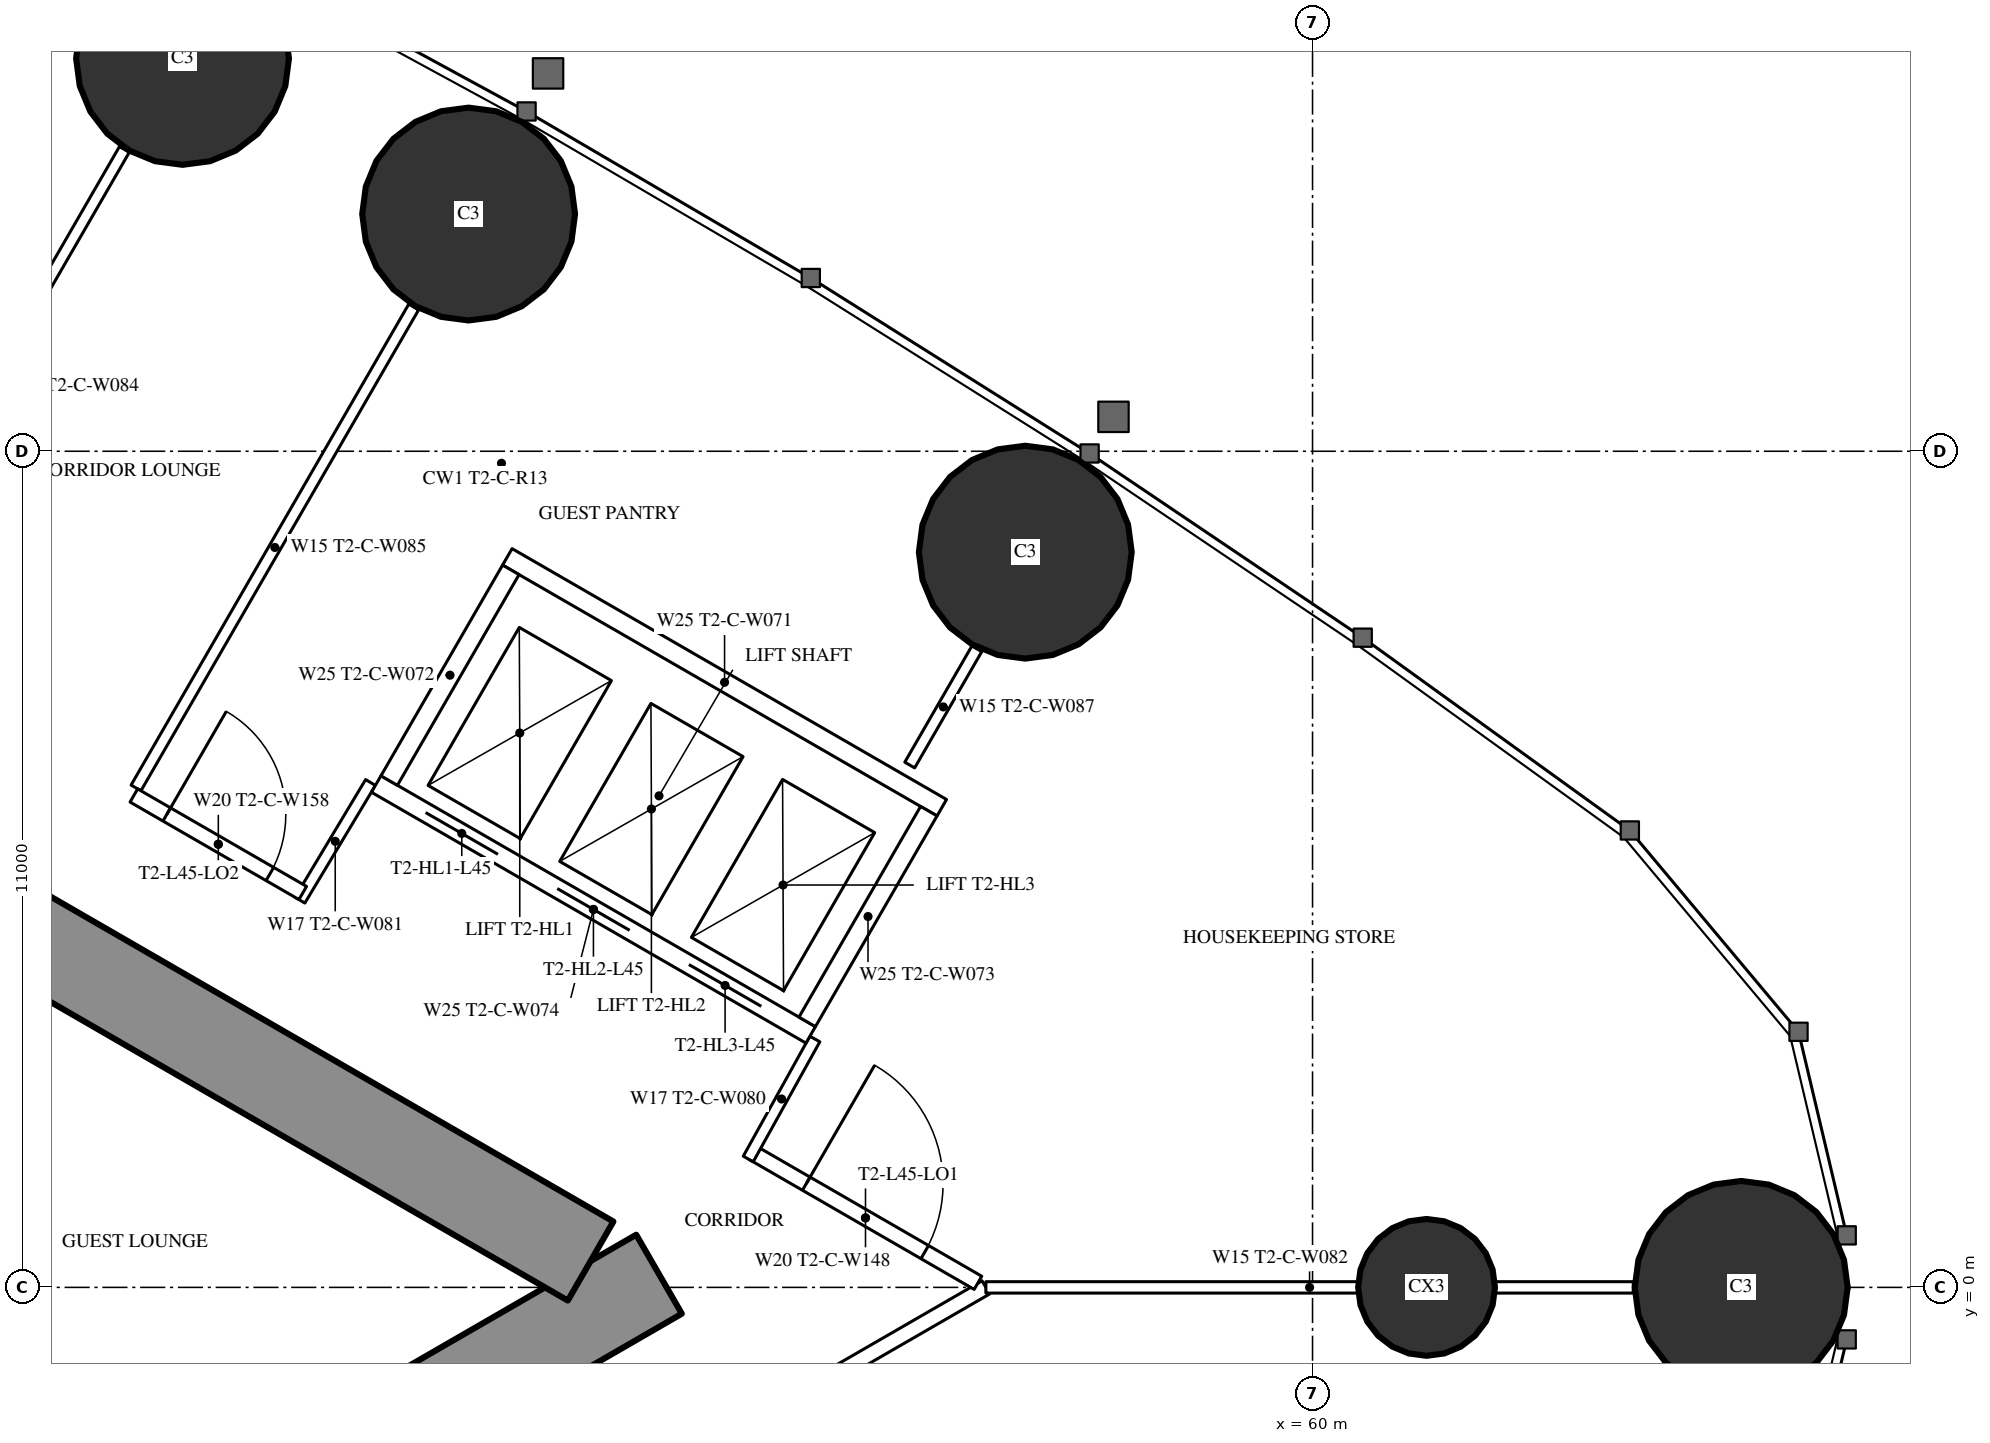
"""IFC4 building model, lengths in metres.
Left out: names, types, materials, properties, quantities, classifications, styles, units other than length and angle.
Written with IfcOpenShell. Run it as: python <this file> out.ifc"""

import sys

from ifc_helpers import new_model, si_unit, direction, frame, frame_2d, origin, origin_2d, place, context, subcontext, project, spatial, rectangle, circle, extrude, element, fill, save


model = new_model("IFC4")
c1 = context("Model", 3, precision=1e-05, world=origin(), true_north=direction((0.0, 1.0)))
c2 = subcontext(c1, "Body", "Model", "MODEL_VIEW")
j1 = project(units=[si_unit("LENGTHUNIT", "METRE"), si_unit("PLANEANGLEUNIT", "RADIAN")], contexts=[c1])
p1 = place(None, origin())
s1 = spatial("IfcSite", under=j1, at=p1, CompositionType="ELEMENT")
p2 = place(p1, origin())
s2 = spatial("IfcBuilding", under=s1, at=p2, CompositionType="ELEMENT")
p3 = place(p2, frame((0.0, 0.0, 170.3)))
s3 = spatial("IfcBuildingStorey", under=s2, at=p3, CompositionType="ELEMENT", Elevation=170.3)
for number, where, z_axis, x_axis in (
    (1, (65.64, 0.0, 0.0), (0.0, 0.0, 1.0), (1.0, 0.0, 0.0)),
    (2, (56.221, 9.672, 0.0), (0.0, 0.0, 1.0), (1.0, 0.0, 0.0)),
    (3, (48.897, 14.121, 0.0), (0.0, 0.0, 1.0), (1.0, 0.0, 0.0)),
    (4, (45.134, 16.168, 0.0), (0.0, 0.0, 1.0), (1.0, 0.0, 0.0)),
):
    element("IfcColumn", number, at=place(p3, frame(where, z_axis=z_axis, x_axis=x_axis)), inside=s3, PredefinedType="COLUMN", context=c2, shape_type="SweptSolid", body=[
        extrude(circle(Radius=1.4, at=origin_2d()), origin(), (0.0, 0.0, 1.0), 3.5),
    ])
p4 = place(p3, frame((61.5, 0.0, 0.0), z_axis=(0.0, 0.0, 1.0), x_axis=(1.0, 0.0, 0.0)))
e5 = element("IfcColumn", 5, at=p4, inside=s3, PredefinedType="COLUMN", context=c2, shape_type="SweptSolid", body=[
    extrude(circle(Radius=0.9, at=origin_2d()), origin(), (0.0, 0.0, 1.0), 3.5),
])
p5 = place(p3, frame((27.2, -13.8, 0.0), z_axis=(0.0, 0.0, 1.0), x_axis=(0.866027159892, 0.499996958321, 0.0)))
e6 = element("IfcWall", 6, at=p5, inside=s3, PredefinedType="SHEAR", context=c2, shape_type="SweptSolid", body=[
    extrude(rectangle(XDim=27.947, YDim=1.2, at=frame_2d((13.973, 0.0))), origin(), (0.0, 0.0, 1.0), 3.5),
])
p6 = place(p5, frame((4.6, 0.0, 0.0)))
e7 = element("IfcOpeningElement", 7, at=p6, cuts=e6, PredefinedType="OPENING", context=c2, shape_type="SweptSolid", body=[
    extrude(rectangle(XDim=1.0, YDim=2.2, at=frame_2d((0.5, 1.1))), frame((0.0, 0.61, 0.0), z_axis=(0.0, -1.0, 0.0), x_axis=(1.0, 0.0, 0.0)), (0.0, 0.0, 1.0), 1.22),
])
p7 = place(p5, frame((13.395, 0.0, 0.0)))
e8 = element("IfcOpeningElement", 8, at=p7, cuts=e6, PredefinedType="OPENING", context=c2, shape_type="SweptSolid", body=[
    extrude(rectangle(XDim=1.8, YDim=2.2, at=frame_2d((0.9, 1.1))), frame((0.0, 0.61, 0.0), z_axis=(0.0, -1.0, 0.0), x_axis=(1.0, 0.0, 0.0)), (0.0, 0.0, 1.0), 1.22),
])
p8 = place(p3, frame((27.2, 13.8, 0.0), z_axis=(0.0, 0.0, 1.0), x_axis=(0.866024515034, -0.500001539357, 0.0)))
e9 = element("IfcWall", 9, at=p8, inside=s3, PredefinedType="SHEAR", context=c2, shape_type="SweptSolid", body=[
    extrude(rectangle(XDim=26.907, YDim=1.2, at=frame_2d((13.454, 0.0))), origin(), (0.0, 0.0, 1.0), 3.5),
])
p9 = place(p8, frame((4.6, 0.0, 0.0)))
e10 = element("IfcOpeningElement", 10, at=p9, cuts=e9, PredefinedType="OPENING", context=c2, shape_type="SweptSolid", body=[
    extrude(rectangle(XDim=1.0, YDim=2.2, at=frame_2d((0.5, 1.1))), frame((0.0, 0.61, 0.0), z_axis=(0.0, -1.0, 0.0), x_axis=(1.0, 0.0, 0.0)), (0.0, 0.0, 1.0), 1.22),
])
p10 = place(p8, frame((13.395, 0.0, 0.0)))
e11 = element("IfcOpeningElement", 11, at=p10, cuts=e9, PredefinedType="OPENING", context=c2, shape_type="SweptSolid", body=[
    extrude(rectangle(XDim=1.8, YDim=2.2, at=frame_2d((0.9, 1.1))), frame((0.0, 0.61, 0.0), z_axis=(0.0, -1.0, 0.0), x_axis=(1.0, 0.0, 0.0)), (0.0, 0.0, 1.0), 1.22),
])
p11 = place(p3, frame((27.959, -16.017, 0.0), z_axis=(0.0, 0.0, 1.0), x_axis=(0.866024151371, 0.500002169237, 0.0)))
e12 = element("IfcWall", 12, at=p11, inside=s3, PredefinedType="PARTITIONING", context=c2, shape_type="SweptSolid", body=[
    extrude(rectangle(XDim=32.034, YDim=0.2, at=frame_2d((16.017, 0.0))), origin(), (0.0, 0.0, 1.0), 3.25),
])
p12 = place(p11, frame((4.765, 0.0, 0.0)))
e13 = element("IfcOpeningElement", 13, at=p12, cuts=e12, PredefinedType="OPENING", context=c2, shape_type="SweptSolid", body=[
    extrude(rectangle(XDim=0.95, YDim=2.2, at=frame_2d((0.475, 1.1))), frame((0.0, 0.11, 0.0), z_axis=(0.0, -1.0, 0.0), x_axis=(1.0, 0.0, 0.0)), (0.0, 0.0, 1.0), 0.22),
])
p13 = place(p11, frame((9.215, 0.0, 0.0)))
e14 = element("IfcOpeningElement", 14, at=p13, cuts=e12, PredefinedType="OPENING", context=c2, shape_type="SweptSolid", body=[
    extrude(rectangle(XDim=1.0, YDim=2.2, at=frame_2d((0.5, 1.1))), frame((0.0, 0.11, 0.0), z_axis=(0.0, -1.0, 0.0), x_axis=(1.0, 0.0, 0.0)), (0.0, 0.0, 1.0), 0.22),
])
p14 = place(p11, frame((19.725, 0.0, 0.0)))
e15 = element("IfcOpeningElement", 15, at=p14, cuts=e12, PredefinedType="OPENING", context=c2, shape_type="SweptSolid", body=[
    extrude(rectangle(XDim=0.95, YDim=2.2, at=frame_2d((0.475, 1.1))), frame((0.0, 0.11, 0.0), z_axis=(0.0, -1.0, 0.0), x_axis=(1.0, 0.0, 0.0)), (0.0, 0.0, 1.0), 0.22),
])
p15 = place(p11, frame((26.125, 0.0, 0.0)))
e16 = element("IfcOpeningElement", 16, at=p15, cuts=e12, PredefinedType="OPENING", context=c2, shape_type="SweptSolid", body=[
    extrude(rectangle(XDim=0.95, YDim=2.2, at=frame_2d((0.475, 1.1))), frame((0.0, 0.11, 0.0), z_axis=(0.0, -1.0, 0.0), x_axis=(1.0, 0.0, 0.0)), (0.0, 0.0, 1.0), 0.22),
])
p16 = place(p11, frame((28.106, 0.0, 0.0)))
e17 = element("IfcOpeningElement", 17, at=p16, cuts=e12, PredefinedType="OPENING", context=c2, shape_type="SweptSolid", body=[
    extrude(rectangle(XDim=0.95, YDim=2.2, at=frame_2d((0.475, 1.1))), frame((0.0, 0.11, 0.0), z_axis=(0.0, -1.0, 0.0), x_axis=(1.0, 0.0, 0.0)), (0.0, 0.0, 1.0), 0.22),
])
p17 = place(p3, frame((40.769, 8.737, 0.0), z_axis=(0.0, 0.0, 1.0), x_axis=(0.500013115284, 0.866017831539, 0.0)))
e18 = element("IfcWall", 18, at=p17, inside=s3, PredefinedType="PARTITIONING", context=c2, shape_type="SweptSolid", body=[
    extrude(rectangle(XDim=7.198, YDim=0.15, at=frame_2d((3.599, 0.0))), origin(), (0.0, 0.0, 1.0), 2.3),
])
p18 = place(p3, frame((44.521, 6.571, 0.0), z_axis=(0.0, 0.0, 1.0), x_axis=(0.500020376429, 0.866013639128, 0.0)))
e19 = element("IfcWall", 19, at=p18, inside=s3, PredefinedType="PARTITIONING", context=c2, shape_type="SweptSolid", body=[
    extrude(rectangle(XDim=7.306, YDim=0.15, at=frame_2d((3.653, 0.0))), origin(), (0.0, 0.0, 1.0), 2.3),
])
p19 = place(p3, frame((55.702, 0.0, 0.0), z_axis=(0.0, 0.0, 1.0), x_axis=(1.0, 0.0, 0.0)))
e20 = element("IfcWall", 20, at=p19, inside=s3, PredefinedType="PARTITIONING", context=c2, shape_type="SweptSolid", body=[
    extrude(rectangle(XDim=8.518, YDim=0.15, at=frame_2d((4.259, 0.0))), origin(), (0.0, 0.0, 1.0), 2.3),
])
p20 = place(p3, frame((54.7, 6.872, 0.0), z_axis=(0.0, 0.0, 1.0), x_axis=(0.499989690894, 0.866031355668, 0.0)))
e21 = element("IfcWall", 21, at=p20, inside=s3, PredefinedType="PARTITIONING", context=c2, shape_type="SweptSolid", body=[
    extrude(rectangle(XDim=1.766, YDim=0.15, at=frame_2d((0.883, 0.0))), origin(), (0.0, 0.0, 1.0), 3.25),
])
p21 = place(p3, frame((52.639, 1.769, 0.0), z_axis=(0.0, 0.0, 1.0), x_axis=(0.866027340901, -0.4999966448, 0.0)))
e22 = element("IfcWall", 22, at=p21, inside=s3, PredefinedType="PARTITIONING", context=c2, shape_type="SweptSolid", body=[
    extrude(rectangle(XDim=3.417, YDim=0.2, at=frame_2d((1.708, 0.0))), origin(), (0.0, 0.0, 1.0), 3.25),
])
p22 = place(p21, frame((0.809, 0.0, 0.0)))
e23 = element("IfcOpeningElement", 23, at=p22, cuts=e22, PredefinedType="OPENING", context=c2, shape_type="SweptSolid", body=[
    extrude(rectangle(XDim=1.8, YDim=2.2, at=frame_2d((0.9, 1.1))), frame((0.0, 0.11, 0.0), z_axis=(0.0, -1.0, 0.0), x_axis=(1.0, 0.0, 0.0)), (0.0, 0.0, 1.0), 0.22),
])
p23 = place(p3, frame((52.576, 1.689, 0.0), z_axis=(0.0, 0.0, 1.0), x_axis=(0.485424724123, 0.874278466629, 0.0)))
e24 = element("IfcWall", 24, at=p23, inside=s3, PredefinedType="PARTITIONING", context=c2, shape_type="SweptSolid", body=[
    extrude(rectangle(XDim=1.805, YDim=0.15, at=frame_2d((0.903, 0.0))), origin(), (0.0, 0.0, 1.0), 3.25),
])
p24 = place(p3, frame((47.606, 6.643, 0.0), z_axis=(0.0, 0.0, 1.0), x_axis=(-0.514237157483, -0.857648031458, 0.0)))
e25 = element("IfcWall", 25, at=p24, inside=s3, PredefinedType="PARTITIONING", context=c2, shape_type="SweptSolid", body=[
    extrude(rectangle(XDim=1.805, YDim=0.15, at=frame_2d((0.902, 0.0))), origin(), (0.0, 0.0, 1.0), 3.25),
])
p25 = place(p3, frame((44.493, 6.472, 0.0), z_axis=(0.0, 0.0, 1.0), x_axis=(0.866027140358, -0.499996992154, 0.0)))
e26 = element("IfcWall", 26, at=p25, inside=s3, PredefinedType="PARTITIONING", context=c2, shape_type="SweptSolid", body=[
    extrude(rectangle(XDim=2.566, YDim=0.2, at=frame_2d((1.283, 0.0))), origin(), (0.0, 0.0, 1.0), 3.25),
])
p26 = place(p25, frame((0.5, 0.0, 0.0)))
e27 = element("IfcOpeningElement", 27, at=p26, cuts=e26, PredefinedType="OPENING", context=c2, shape_type="SweptSolid", body=[
    extrude(rectangle(XDim=1.566, YDim=2.2, at=frame_2d((0.783, 1.1))), frame((0.0, 0.11, 0.0), z_axis=(0.0, -1.0, 0.0), x_axis=(1.0, 0.0, 0.0)), (0.0, 0.0, 1.0), 0.22),
])
p27 = place(p3, frame((47.681, 6.622, 0.0), z_axis=(0.0, 0.0, 1.0), x_axis=(0.86603344179, -0.499986077507, 0.0)))
e28 = element("IfcWall", 28, at=p27, inside=s3, PredefinedType="PARTITIONING", context=c2, shape_type="SweptSolid", body=[
    extrude(rectangle(XDim=6.6, YDim=0.25, at=frame_2d((3.3, 0.0))), origin(), (0.0, 0.0, 1.0), 3.25),
])
p28 = place(p27, frame((0.75, 0.0, 0.0)))
e29 = element("IfcOpeningElement", 29, at=p28, cuts=e28, PredefinedType="OPENING", context=c2, shape_type="SweptSolid", body=[
    extrude(rectangle(XDim=1.1, YDim=2.2, at=frame_2d((0.55, 1.1))), frame((0.0, 0.135, 0.0), z_axis=(0.0, -1.0, 0.0), x_axis=(1.0, 0.0, 0.0)), (0.0, 0.0, 1.0), 0.27),
])
p29 = place(p27, frame((2.75, 0.0, 0.0)))
e30 = element("IfcOpeningElement", 30, at=p29, cuts=e28, PredefinedType="OPENING", context=c2, shape_type="SweptSolid", body=[
    extrude(rectangle(XDim=1.1, YDim=2.2, at=frame_2d((0.55, 1.1))), frame((0.0, 0.135, 0.0), z_axis=(0.0, -1.0, 0.0), x_axis=(1.0, 0.0, 0.0)), (0.0, 0.0, 1.0), 0.27),
])
p30 = place(p27, frame((4.75, 0.0, 0.0)))
e31 = element("IfcOpeningElement", 31, at=p30, cuts=e28, PredefinedType="OPENING", context=c2, shape_type="SweptSolid", body=[
    extrude(rectangle(XDim=1.1, YDim=2.2, at=frame_2d((0.55, 1.1))), frame((0.0, 0.135, 0.0), z_axis=(0.0, -1.0, 0.0), x_axis=(1.0, 0.0, 0.0)), (0.0, 0.0, 1.0), 0.27),
])
p31 = place(p3, frame((49.406, 9.611, 0.0), z_axis=(0.0, 0.0, 1.0), x_axis=(0.86603344179, -0.499986077507, 0.0)))
e32 = element("IfcWall", 32, at=p31, inside=s3, PredefinedType="PARTITIONING", context=c2, shape_type="SweptSolid", body=[
    extrude(rectangle(XDim=6.6, YDim=0.25, at=frame_2d((3.3, 0.0))), origin(), (0.0, 0.0, 1.0), 3.25),
])
p32 = place(p3, frame((47.852, 6.668, 0.0), z_axis=(0.0, 0.0, 1.0), x_axis=(0.499929347863, 0.866066190972, 0.0)))
e33 = element("IfcWall", 33, at=p32, inside=s3, PredefinedType="PARTITIONING", context=c2, shape_type="SweptSolid", body=[
    extrude(rectangle(XDim=3.201, YDim=0.25, at=frame_2d((1.6, 0.0))), origin(), (0.0, 0.0, 1.0), 3.25),
])
p33 = place(p3, frame((53.352, 3.493, 0.0), z_axis=(0.0, 0.0, 1.0), x_axis=(0.499872130319, 0.866099216793, 0.0)))
e34 = element("IfcWall", 34, at=p33, inside=s3, PredefinedType="PARTITIONING", context=c2, shape_type="SweptSolid", body=[
    extrude(rectangle(XDim=3.2, YDim=0.25, at=frame_2d((1.6, 0.0))), origin(), (0.0, 0.0, 1.0), 3.25),
])
p34 = place(p22, origin())
e35 = element("IfcDoor", 35, at=p34, inside=s3, OperationType="DOUBLE_DOOR_SINGLE_SWING", PredefinedType="DOOR", context=c2, shape_type="SweptSolid", body=[
    extrude(rectangle(XDim=1.8, YDim=2.2, at=frame_2d((0.9, 1.1))), frame((0.0, 0.025, 0.0), z_axis=(0.0, -1.0, 0.0), x_axis=(1.0, 0.0, 0.0)), (0.0, 0.0, 1.0), 0.05),
])
fill(e23, e35)
p35 = place(p26, origin())
e36 = element("IfcDoor", 36, at=p35, inside=s3, OperationType="SINGLE_SWING_LEFT", PredefinedType="DOOR", context=c2, shape_type="SweptSolid", body=[
    extrude(rectangle(XDim=1.566, YDim=2.2, at=frame_2d((0.783, 1.1))), frame((0.0, 0.025, 0.0), z_axis=(0.0, -1.0, 0.0), x_axis=(1.0, 0.0, 0.0)), (0.0, 0.0, 1.0), 0.05),
])
fill(e27, e36)
p36 = place(p28, origin())
e37 = element("IfcDoor", 37, at=p36, inside=s3, OperationType="DOUBLE_DOOR_SLIDING", PredefinedType="USERDEFINED", context=c2, shape_type="SweptSolid", body=[
    extrude(rectangle(XDim=1.1, YDim=2.2, at=frame_2d((0.55, 1.1))), frame((0.0, 0.025, 0.0), z_axis=(0.0, -1.0, 0.0), x_axis=(1.0, 0.0, 0.0)), (0.0, 0.0, 1.0), 0.05),
])
fill(e29, e37)
p37 = place(p29, origin())
e38 = element("IfcDoor", 38, at=p37, inside=s3, OperationType="DOUBLE_DOOR_SLIDING", PredefinedType="USERDEFINED", context=c2, shape_type="SweptSolid", body=[
    extrude(rectangle(XDim=1.1, YDim=2.2, at=frame_2d((0.55, 1.1))), frame((0.0, 0.025, 0.0), z_axis=(0.0, -1.0, 0.0), x_axis=(1.0, 0.0, 0.0)), (0.0, 0.0, 1.0), 0.05),
])
fill(e30, e38)
p38 = place(p30, origin())
e39 = element("IfcDoor", 39, at=p38, inside=s3, OperationType="DOUBLE_DOOR_SLIDING", PredefinedType="USERDEFINED", context=c2, shape_type="SweptSolid", body=[
    extrude(rectangle(XDim=1.1, YDim=2.2, at=frame_2d((0.55, 1.1))), frame((0.0, 0.025, 0.0), z_axis=(0.0, -1.0, 0.0), x_axis=(1.0, 0.0, 0.0)), (0.0, 0.0, 1.0), 0.05),
])
fill(e31, e39)
save(model, sys.argv[1])
